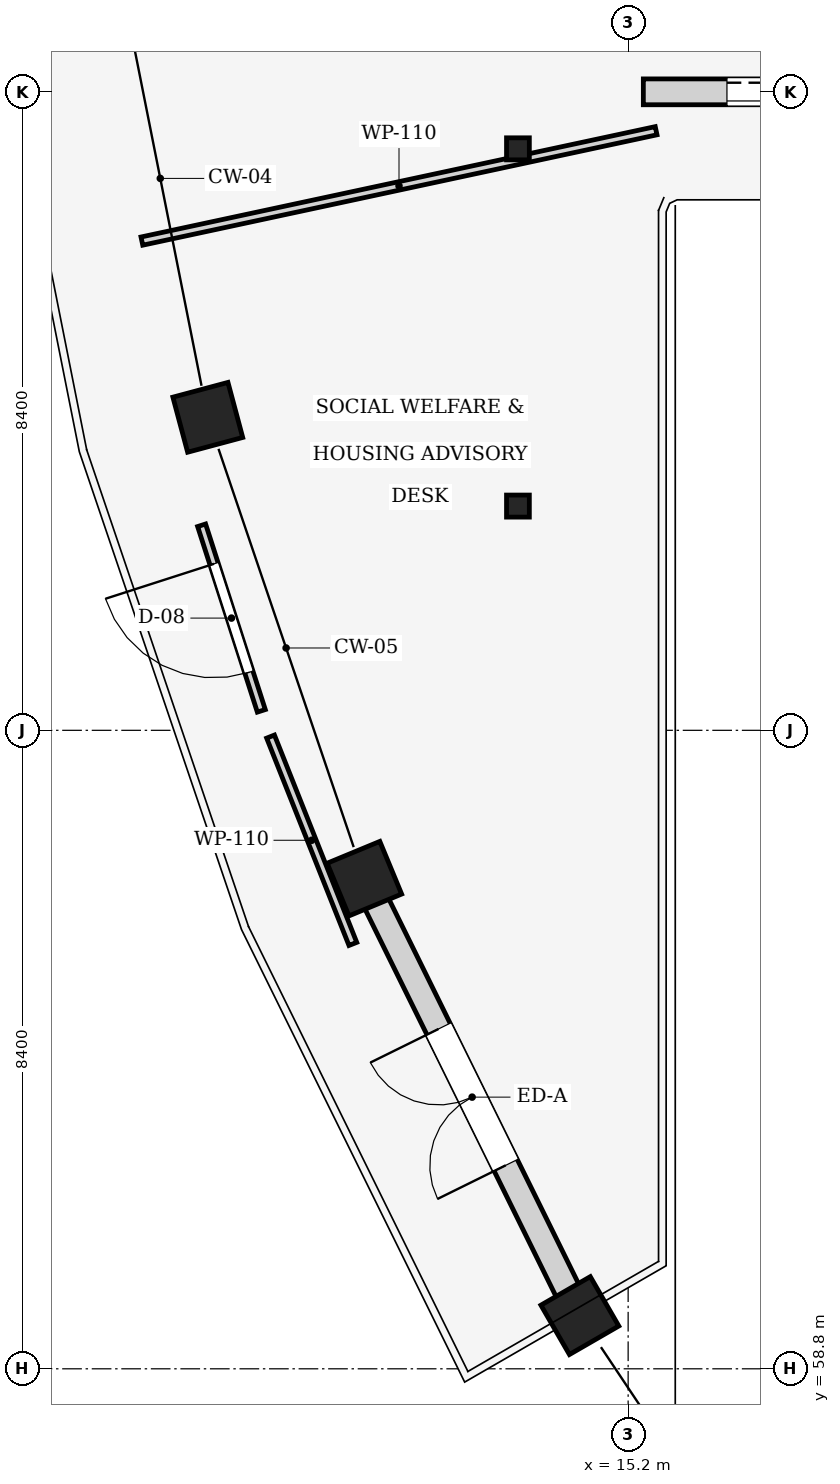
"""IFC4 building model, lengths in metres.
Left out: names, types, materials, properties, quantities, classifications, styles, units other than length and angle.
Written with IfcOpenShell. Run it as: python <this file> out.ifc"""

import sys

from ifc_helpers import new_model, si_unit, direction, frame, frame_2d, origin, origin_2d, place, context, subcontext, project, spatial, rectangle, circle, i_section, extrude, element, fill, save


model = new_model("IFC4")
c1 = context("Model", 3, precision=1e-05, world=origin(), true_north=direction((0.0, 1.0)))
c2 = subcontext(c1, "Body", "Model", "MODEL_VIEW")
j1 = project(units=[si_unit("LENGTHUNIT", "METRE"), si_unit("PLANEANGLEUNIT", "RADIAN")], contexts=[c1])
p1 = place(None, origin())
s1 = spatial("IfcSite", under=j1, at=p1, CompositionType="ELEMENT")
p2 = place(p1, origin())
s2 = spatial("IfcBuilding", under=s1, at=p2, CompositionType="ELEMENT")
p3 = place(p2, origin())
s3 = spatial("IfcBuildingStorey", under=s2, at=p3, CompositionType="ELEMENT", Elevation=0.0)
for number, where, z_axis, x_axis in (
    (1, (9.67, 71.318, 0.0), (0.0, 0.0, 1.0), (-0.966, -0.259, 0.0)),
    (2, (11.73, 65.249, 0.0), (0.0, 0.0, 1.0), (-0.924, -0.383, 0.0)),
    (3, (14.565, 59.5, 0.0), (0.0, 0.0, 1.0), (-0.866, -0.5, 0.0)),
):
    element("IfcColumn", number, at=place(p3, frame(where, z_axis=z_axis, x_axis=x_axis)), inside=s3, PredefinedType="COLUMN", context=c2, shape_type="SweptSolid", body=[
        extrude(circle(Radius=0.375, at=origin_2d()), origin(), (0.0, 0.0, 1.0), 5.1),
    ])
for number, where, z_axis, x_axis in (
    (4, (13.75, 70.15, 0.0), (0.0, 0.0, 1.0), (1.0, 0.0, 0.0)),
    (5, (13.75, 74.85, 0.0), (0.0, 0.0, 1.0), (1.0, 0.0, 0.0)),
):
    element("IfcColumn", number, at=place(p3, frame(where, z_axis=z_axis, x_axis=x_axis)), inside=s3, PredefinedType="COLUMN", context=c2, shape_type="SweptSolid", body=[
        extrude(i_section(OverallWidth=0.3, OverallDepth=0.29, WebThickness=0.009, FlangeThickness=0.014, at=origin_2d()), origin(), (0.0, 0.0, 1.0), 5.1),
    ])
p4 = place(p3, frame((14.412, 59.81, 0.0), z_axis=(0.0, 0.0, 1.0), x_axis=(-0.442288249958, 0.896872958645, 0.0)))
e6 = element("IfcWall", 6, at=p4, inside=s3, PredefinedType="STANDARD", context=c2, shape_type="SweptSolid", body=[
    extrude(rectangle(XDim=5.718, YDim=0.34, at=frame_2d((2.859, 0.0))), origin(), (0.0, 0.0, 1.0), 4.195),
])
p5 = place(p4, frame((1.859, 0.0, 0.0)))
e7 = element("IfcOpeningElement", 7, at=p5, cuts=e6, PredefinedType="OPENING", context=c2, shape_type="SweptSolid", body=[
    extrude(rectangle(XDim=2.0, YDim=2.4, at=frame_2d((1.0, 1.2))), frame((0.0, 0.18, 0.0), z_axis=(0.0, -1.0, 0.0), x_axis=(1.0, 0.0, 0.0)), (0.0, 0.0, 1.0), 0.36),
])
p6 = place(p3, frame((15.4, 75.6, 0.0), z_axis=(0.0, 0.0, 1.0), x_axis=(1.0, 0.0, 0.0)))
e8 = element("IfcWall", 8, at=p6, inside=s3, PredefinedType="STANDARD", context=c2, shape_type="SweptSolid", body=[
    extrude(rectangle(XDim=6.8, YDim=0.34, at=frame_2d((3.4, 0.0))), origin(), (0.0, 0.0, 1.0), 4.2),
])
p7 = place(p6, frame((1.1, 0.0, 0.0)))
e9 = element("IfcOpeningElement", 9, at=p7, cuts=e8, PredefinedType="OPENING", context=c2, shape_type="SweptSolid", body=[
    extrude(rectangle(XDim=4.6, YDim=3.2, at=frame_2d((2.3, 1.6))), frame((0.0, 0.18, 0.0), z_axis=(0.0, -1.0, 0.0), x_axis=(1.0, 0.0, 0.0)), (0.0, 0.0, 1.0), 0.36),
])
p8 = place(p3, frame((11.578, 64.39, 0.0), z_axis=(0.0, 0.0, 1.0), x_axis=(-0.368936782187, 0.929454490951, 0.0)))
e10 = element("IfcWall", 10, at=p8, inside=s3, PredefinedType="PARTITIONING", context=c2, shape_type="SweptSolid", body=[
    extrude(rectangle(XDim=2.935, YDim=0.11, at=frame_2d((1.467, 0.0))), origin(), (0.0, 0.0, 1.0), 4.73),
])
p9 = place(p3, frame((10.374, 67.456, 0.0), z_axis=(0.0, 0.0, 1.0), x_axis=(-0.306301870274, 0.951934432756, 0.0)))
e11 = element("IfcWall", 11, at=p9, inside=s3, PredefinedType="PARTITIONING", context=c2, shape_type="SweptSolid", body=[
    extrude(rectangle(XDim=2.565, YDim=0.11, at=frame_2d((1.282, 0.0))), origin(), (0.0, 0.0, 1.0), 4.73),
])
p10 = place(p9, frame((0.532, 0.0, 0.0)))
e12 = element("IfcOpeningElement", 12, at=p10, cuts=e11, PredefinedType="OPENING", context=c2, shape_type="SweptSolid", body=[
    extrude(rectangle(XDim=1.5, YDim=2.1, at=frame_2d((0.75, 1.05))), frame((0.0, 0.065, 0.0), z_axis=(0.0, -1.0, 0.0), x_axis=(1.0, 0.0, 0.0)), (0.0, 0.0, 1.0), 0.13),
])
p11 = place(p3, frame((8.802, 73.636, 0.0), z_axis=(0.0, 0.0, 1.0), x_axis=(0.977733693302, 0.209849529382, 0.0)))
e13 = element("IfcWall", 13, at=p11, inside=s3, PredefinedType="PARTITIONING", context=c2, shape_type="SweptSolid", body=[
    extrude(rectangle(XDim=6.92, YDim=0.11, at=frame_2d((3.46, 0.0))), origin(), (0.0, 0.0, 1.0), 4.195),
])
p12 = place(p5, origin())
e14 = element("IfcDoor", 14, at=p12, inside=s3, OperationType="DOUBLE_DOOR_SINGLE_SWING", PredefinedType="DOOR", context=c2, shape_type="SweptSolid", body=[
    extrude(rectangle(XDim=2.0, YDim=2.4, at=frame_2d((1.0, 1.2))), frame((0.0, 0.025, 0.0), z_axis=(0.0, -1.0, 0.0), x_axis=(1.0, 0.0, 0.0)), (0.0, 0.0, 1.0), 0.05),
])
fill(e7, e14)
p13 = place(p7, origin())
e15 = element("IfcDoor", 15, at=p13, inside=s3, OperationType="ROLLINGUP", PredefinedType="GATE", context=c2, shape_type="SweptSolid", body=[
    extrude(rectangle(XDim=4.6, YDim=3.2, at=frame_2d((2.3, 1.6))), frame((0.0, 0.025, 0.0), z_axis=(0.0, -1.0, 0.0), x_axis=(1.0, 0.0, 0.0)), (0.0, 0.0, 1.0), 0.05),
])
fill(e9, e15)
p14 = place(p10, origin())
e16 = element("IfcDoor", 16, at=p14, inside=s3, OperationType="SINGLE_SWING_RIGHT", PredefinedType="DOOR", context=c2, shape_type="SweptSolid", body=[
    extrude(rectangle(XDim=1.5, YDim=2.1, at=frame_2d((0.75, 1.05))), frame((0.0, 0.025, 0.0), z_axis=(0.0, -1.0, 0.0), x_axis=(1.0, 0.0, 0.0)), (0.0, 0.0, 1.0), 0.05),
])
fill(e12, e16)
save(model, sys.argv[1])
